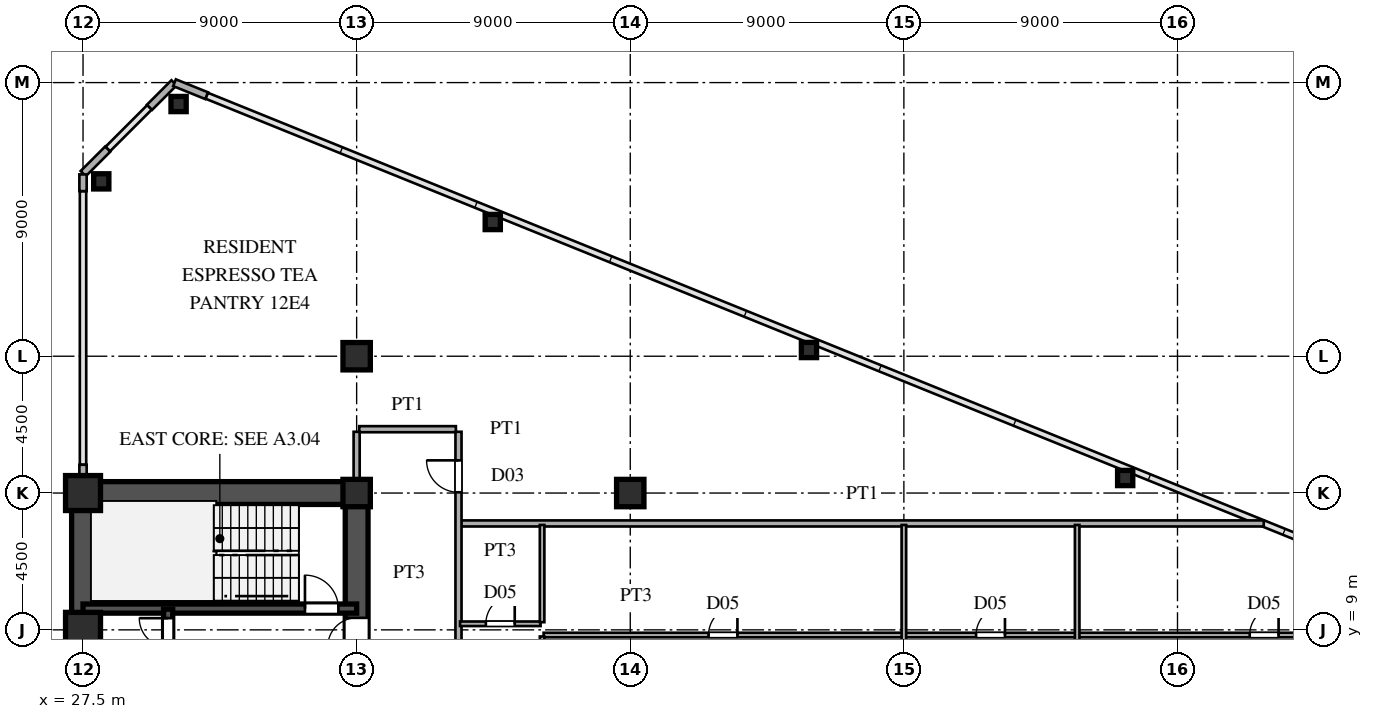
"""IFC4 building model, lengths in metres.
Left out: names, types, materials, properties, quantities, classifications, styles, units other than length and angle.
Written with IfcOpenShell. Run it as: python <this file> out.ifc"""

import sys

from ifc_helpers import new_model, si_unit, direction, frame, frame_2d, origin, origin_2d, place, context, subcontext, project, spatial, rectangle, hollow_rectangle, i_section, extrude, source, transform, mapped, element, fill, save


model = new_model("IFC4")
c1 = context("Model", 3, precision=1e-05, world=origin(), true_north=direction((0.0, 1.0)))
c2 = subcontext(c1, "Body", "Model", "MODEL_VIEW")
j1 = project(units=[si_unit("LENGTHUNIT", "METRE"), si_unit("PLANEANGLEUNIT", "RADIAN")], contexts=[c1])
p1 = place(None, origin())
s1 = spatial("IfcSite", under=j1, at=p1, CompositionType="ELEMENT")
p2 = place(p1, origin())
s2 = spatial("IfcBuilding", under=s1, at=p2, CompositionType="ELEMENT")
p3 = place(p2, frame((0.0, 0.0, 47.7)))
s3 = spatial("IfcBuildingStorey", under=s2, at=p3, CompositionType="ELEMENT", Elevation=47.7)
m1 = source(origin(), c2, "Body", "SweptSolid", [
    extrude(hollow_rectangle(XDim=1.15, YDim=1.15, WallThickness=0.048, at=origin_2d()), origin(), (0.0, 0.0, 1.0), 3.6),
])
for number, where, z_axis, x_axis in (
    (1, (27.5, 9.0, 0.0), (0.0, 0.0, 1.0), (1.0, 0.0, 0.0)),
    (2, (27.5, 13.5, 0.0), (0.0, 0.0, 1.0), (1.0, 0.0, 0.0)),
):
    element("IfcColumn", number, at=place(p3, frame(where, z_axis=z_axis, x_axis=x_axis)), inside=s3, PredefinedType="COLUMN", context=c2, shape_type="MappedRepresentation", body=[
        mapped(m1, transform((0.0, 0.0, 0.0), scale=1.0)),
    ])
m2 = source(origin(), c2, "Body", "SweptSolid", [
    extrude(i_section(OverallWidth=0.9, OverallDepth=0.9, WebThickness=0.036, FlangeThickness=0.055, at=origin_2d()), origin(), (0.0, 0.0, 1.0), 3.6),
])
for number, where, z_axis, x_axis in (
    (3, (36.5, 13.5, 0.0), (0.0, 0.0, 1.0), (1.0, 0.0, 0.0)),
    (4, (36.5, 18.0, 0.0), (0.0, 0.0, 1.0), (1.0, 0.0, 0.0)),
    (5, (45.5, 13.5, 0.0), (0.0, 0.0, 1.0), (1.0, 0.0, 0.0)),
):
    element("IfcColumn", number, at=place(p3, frame(where, z_axis=z_axis, x_axis=x_axis)), inside=s3, PredefinedType="COLUMN", context=c2, shape_type="MappedRepresentation", body=[
        mapped(m2, transform((0.0, 0.0, 0.0), scale=1.0)),
    ])
m3 = source(origin(), c2, "Body", "SweptSolid", [
    extrude(hollow_rectangle(XDim=0.5, YDim=0.5, WallThickness=0.02, at=origin_2d()), origin(), (0.0, 0.0, 1.0), 3.6),
])
for number, where, z_axis, x_axis in (
    (6, (30.643, 26.295, 0.0), (0.0, 0.0, 1.0), (1.0, 0.0, 0.0)),
    (7, (28.1, 23.751, 0.0), (0.0, 0.0, 1.0), (1.0, 0.0, 0.0)),
    (8, (40.977, 22.414, 0.0), (0.0, 0.0, 1.0), (1.0, 0.0, 0.0)),
    (9, (51.378, 18.204, 0.0), (0.0, 0.0, 1.0), (1.0, 0.0, 0.0)),
    (10, (61.779, 13.994, 0.0), (0.0, 0.0, 1.0), (1.0, 0.0, 0.0)),
):
    element("IfcColumn", number, at=place(p3, frame(where, z_axis=z_axis, x_axis=x_axis)), inside=s3, PredefinedType="COLUMN", context=c2, shape_type="MappedRepresentation", body=[
        mapped(m3, transform((0.0, 0.0, 0.0), scale=1.0)),
    ])
p4 = place(p3, frame((31.566, 26.569, 0.0), z_axis=(0.0, 0.0, 1.0), x_axis=(-0.927007103665, 0.375043770452, 0.0)))
e11 = element("IfcWall", 11, at=p4, inside=s3, PredefinedType="SOLIDWALL", context=c2, shape_type="SweptSolid", body=[
    extrude(rectangle(XDim=1.14, YDim=0.24, at=frame_2d((0.57, 0.0))), origin(), (0.0, 0.0, 1.0), 3.38),
])
for number, where, z_axis, x_axis in (
    (12, (30.493, 26.993, 0.0), (0.0, 0.0, 1.0), (-0.707, -0.707, 0.0)),
    (13, (28.313, 24.813, 0.0), (0.0, 0.0, 1.0), (-0.707, -0.707, 0.0)),
):
    element("IfcWall", number, at=place(p3, frame(where, z_axis=z_axis, x_axis=x_axis)), inside=s3, PredefinedType="SOLIDWALL", context=c2, shape_type="SweptSolid", body=[
        extrude(rectangle(XDim=1.14, YDim=0.24, at=frame_2d((0.57, 0.0))), origin(), (0.0, 0.0, 1.0), 3.38),
    ])
p5 = place(p3, frame((27.5, 13.88, 0.0), z_axis=(0.0, 0.0, 1.0), x_axis=(0.0, 1.0, 0.0)))
e14 = element("IfcWall", 14, at=p5, inside=s3, PredefinedType="SOLIDWALL", context=c2, shape_type="SweptSolid", body=[
    extrude(rectangle(XDim=0.55, YDim=0.24, at=frame_2d((0.275, 0.0))), origin(), (0.0, 0.0, 1.0), 2.88),
])
p6 = place(p3, frame((27.5, 23.43, 0.0), z_axis=(0.0, 0.0, 1.0), x_axis=(0.0, 1.0, 0.0)))
e15 = element("IfcWall", 15, at=p6, inside=s3, PredefinedType="SOLIDWALL", context=c2, shape_type="SweptSolid", body=[
    extrude(rectangle(XDim=0.55, YDim=0.24, at=frame_2d((0.275, 0.0))), origin(), (0.0, 0.0, 1.0), 3.38),
])
p7 = place(p3, frame((27.5, 1.3, 0.0), z_axis=(0.0, 0.0, 1.0), x_axis=(0.0, 1.0, 0.0)))
e16 = element("IfcWall", 16, at=p7, inside=s3, PredefinedType="SHEAR", context=c2, shape_type="SweptSolid", body=[
    extrude(rectangle(XDim=12.2, YDim=0.75, at=frame_2d((6.1, 0.0))), origin(), (0.0, 0.0, 1.0), 3.38),
])
p8 = place(p3, frame((27.5, 13.5, 0.0), z_axis=(0.0, 0.0, 1.0), x_axis=(1.0, 0.0, 0.0)))
e17 = element("IfcWall", 17, at=p8, inside=s3, PredefinedType="SHEAR", context=c2, shape_type="SweptSolid", body=[
    extrude(rectangle(XDim=9.0, YDim=0.75, at=frame_2d((4.5, 0.0))), origin(), (0.0, 0.0, 1.0), 3.38),
])
p9 = place(p3, frame((36.5, 8.2, 0.0), z_axis=(0.0, 0.0, 1.0), x_axis=(0.0, 1.0, 0.0)))
e18 = element("IfcWall", 18, at=p9, inside=s3, PredefinedType="SHEAR", context=c2, shape_type="SweptSolid", body=[
    extrude(rectangle(XDim=5.45, YDim=0.75, at=frame_2d((2.725, 0.0))), origin(), (0.0, 0.0, 1.0), 3.38),
])
p10 = place(p9, frame((0.245, 0.0, 0.0)))
e19 = element("IfcOpeningElement", 19, at=p10, cuts=e18, PredefinedType="OPENING", context=c2, shape_type="SweptSolid", body=[
    extrude(rectangle(XDim=0.95, YDim=2.15, at=frame_2d((0.475, 1.075))), frame((0.0, 0.385, 0.0), z_axis=(0.0, -1.0, 0.0), x_axis=(1.0, 0.0, 0.0)), (0.0, 0.0, 1.0), 0.77),
])
p11 = place(p3, frame((27.5, 9.7, 0.0), z_axis=(0.0, 0.0, 1.0), x_axis=(1.0, 0.0, 0.0)))
e20 = element("IfcWall", 20, at=p11, inside=s3, PredefinedType="SHEAR", context=c2, shape_type="SweptSolid", body=[
    extrude(rectangle(XDim=9.0, YDim=0.3, at=frame_2d((4.5, 0.0))), origin(), (0.0, 0.0, 1.0), 3.38),
])
p12 = place(p11, frame((7.3, 0.0, 0.0)))
e21 = element("IfcOpeningElement", 21, at=p12, cuts=e20, PredefinedType="OPENING", context=c2, shape_type="SweptSolid", body=[
    extrude(rectangle(XDim=1.1, YDim=2.2, at=frame_2d((0.55, 1.1))), frame((0.0, 0.16, 0.0), z_axis=(0.0, -1.0, 0.0), x_axis=(1.0, 0.0, 0.0)), (0.0, 0.0, 1.0), 0.32),
])
p13 = place(p3, frame((30.3, 8.15, 0.0), z_axis=(0.0, 0.0, 1.0), x_axis=(0.0, 1.0, 0.0)))
e22 = element("IfcWall", 22, at=p13, inside=s3, PredefinedType="SHEAR", context=c2, shape_type="SweptSolid", body=[
    extrude(rectangle(XDim=1.53, YDim=0.3, at=frame_2d((0.765, 0.0))), origin(), (0.0, 0.0, 1.0), 3.38),
])
p14 = place(p13, frame((0.285, 0.0, 0.0)))
e23 = element("IfcOpeningElement", 23, at=p14, cuts=e22, PredefinedType="OPENING", context=c2, shape_type="SweptSolid", body=[
    extrude(rectangle(XDim=0.95, YDim=2.15, at=frame_2d((0.475, 1.075))), frame((0.0, 0.16, 0.0), z_axis=(0.0, -1.0, 0.0), x_axis=(1.0, 0.0, 0.0)), (0.0, 0.0, 1.0), 0.32),
])
p15 = place(p3, frame((42.65, 8.83, 0.0), z_axis=(0.0, 0.0, 1.0), x_axis=(1.0, 0.0, 0.0)))
e24 = element("IfcWall", 24, at=p15, inside=s3, PredefinedType="PARTITIONING", context=c2, shape_type="SweptSolid", body=[
    extrude(rectangle(XDim=29.885, YDim=0.15, at=frame_2d((14.942, 0.0))), origin(), (0.0, 0.0, 1.0), 3.38),
])
p16 = place(p15, frame((5.425, 0.0, 0.0)))
e25 = element("IfcOpeningElement", 25, at=p16, cuts=e24, PredefinedType="OPENING", context=c2, shape_type="SweptSolid", body=[
    extrude(rectangle(XDim=0.95, YDim=2.15, at=frame_2d((0.475, 1.075))), frame((0.0, 0.085, 0.0), z_axis=(0.0, -1.0, 0.0), x_axis=(1.0, 0.0, 0.0)), (0.0, 0.0, 1.0), 0.17),
])
p17 = place(p15, frame((23.225, 0.0, 0.0)))
e26 = element("IfcOpeningElement", 26, at=p17, cuts=e24, PredefinedType="OPENING", context=c2, shape_type="SweptSolid", body=[
    extrude(rectangle(XDim=0.95, YDim=2.15, at=frame_2d((0.475, 1.075))), frame((0.0, 0.085, 0.0), z_axis=(0.0, -1.0, 0.0), x_axis=(1.0, 0.0, 0.0)), (0.0, 0.0, 1.0), 0.17),
])
p18 = place(p15, frame((14.225, 0.0, 0.0)))
e27 = element("IfcOpeningElement", 27, at=p18, cuts=e24, PredefinedType="OPENING", context=c2, shape_type="SweptSolid", body=[
    extrude(rectangle(XDim=0.95, YDim=2.15, at=frame_2d((0.475, 1.075))), frame((0.0, 0.085, 0.0), z_axis=(0.0, -1.0, 0.0), x_axis=(1.0, 0.0, 0.0)), (0.0, 0.0, 1.0), 0.17),
])
p19 = place(p3, frame((39.9, 9.2, 0.0), z_axis=(0.0, 0.0, 1.0), x_axis=(1.0, 0.0, 0.0)))
e28 = element("IfcWall", 28, at=p19, inside=s3, PredefinedType="PARTITIONING", context=c2, shape_type="SweptSolid", body=[
    extrude(rectangle(XDim=2.65, YDim=0.15, at=frame_2d((1.325, 0.0))), origin(), (0.0, 0.0, 1.0), 3.38),
])
p20 = place(p19, frame((0.85, 0.0, 0.0)))
e29 = element("IfcOpeningElement", 29, at=p20, cuts=e28, PredefinedType="OPENING", context=c2, shape_type="SweptSolid", body=[
    extrude(rectangle(XDim=0.95, YDim=2.15, at=frame_2d((0.475, 1.075))), frame((0.0, 0.085, 0.0), z_axis=(0.0, -1.0, 0.0), x_axis=(1.0, 0.0, 0.0)), (0.0, 0.0, 1.0), 0.17),
])
p21 = place(p3, frame((39.93, 12.5, 0.0), z_axis=(0.0, 0.0, 1.0), x_axis=(1.0, 0.0, 0.0)))
e30 = element("IfcWall", 30, at=p21, inside=s3, PredefinedType="PARTITIONING", context=c2, shape_type="SweptSolid", body=[
    extrude(rectangle(XDim=26.407, YDim=0.2, at=frame_2d((13.204, 0.0))), origin(), (0.0, 0.0, 1.0), 3.38),
])
p22 = place(p3, frame((36.585, 15.6, 0.0), z_axis=(0.0, 0.0, 1.0), x_axis=(1.0, 0.0, 0.0)))
e31 = element("IfcWall", 31, at=p22, inside=s3, PredefinedType="PARTITIONING", context=c2, shape_type="SweptSolid", body=[
    extrude(rectangle(XDim=3.18, YDim=0.2, at=frame_2d((1.59, 0.0))), origin(), (0.0, 0.0, 1.0), 3.38),
])
p23 = place(p3, frame((36.5, 13.88, 0.0), z_axis=(0.0, 0.0, 1.0), x_axis=(0.0, 1.0, 0.0)))
e32 = element("IfcWall", 32, at=p23, inside=s3, PredefinedType="PARTITIONING", context=c2, shape_type="SweptSolid", body=[
    extrude(rectangle(XDim=1.635, YDim=0.2, at=frame_2d((0.817, 0.0))), origin(), (0.0, 0.0, 1.0), 2.68),
])
p24 = place(p3, frame((39.85, -15.515, 0.0), z_axis=(0.0, 0.0, 1.0), x_axis=(0.0, 1.0, 0.0)))
e33 = element("IfcWall", 33, at=p24, inside=s3, PredefinedType="PARTITIONING", context=c2, shape_type="SweptSolid", body=[
    extrude(rectangle(XDim=31.03, YDim=0.2, at=frame_2d((15.515, 0.0))), origin(), (0.0, 0.0, 1.0), 3.38),
])
p25 = place(p24, frame((0.94, 0.0, 0.0)))
e34 = element("IfcOpeningElement", 34, at=p25, cuts=e33, PredefinedType="OPENING", context=c2, shape_type="SweptSolid", body=[
    extrude(rectangle(XDim=1.05, YDim=2.25, at=frame_2d((0.525, 1.125))), frame((0.0, 0.11, 0.0), z_axis=(0.0, -1.0, 0.0), x_axis=(1.0, 0.0, 0.0)), (0.0, 0.0, 1.0), 0.22),
])
p26 = place(p24, frame((9.28, 0.0, 0.0)))
e35 = element("IfcOpeningElement", 35, at=p26, cuts=e33, PredefinedType="OPENING", context=c2, shape_type="SweptSolid", body=[
    extrude(rectangle(XDim=1.05, YDim=2.25, at=frame_2d((0.525, 1.125))), frame((0.0, 0.11, 0.0), z_axis=(0.0, -1.0, 0.0), x_axis=(1.0, 0.0, 0.0)), (0.0, 0.0, 1.0), 0.22),
])
p27 = place(p24, frame((21.825, 0.0, 0.0)))
e36 = element("IfcOpeningElement", 36, at=p27, cuts=e33, PredefinedType="OPENING", context=c2, shape_type="SweptSolid", body=[
    extrude(rectangle(XDim=1.05, YDim=2.25, at=frame_2d((0.525, 1.125))), frame((0.0, 0.11, 0.0), z_axis=(0.0, -1.0, 0.0), x_axis=(1.0, 0.0, 0.0)), (0.0, 0.0, 1.0), 0.22),
])
p28 = place(p24, frame((29.04, 0.0, 0.0)))
e37 = element("IfcOpeningElement", 37, at=p28, cuts=e33, PredefinedType="OPENING", context=c2, shape_type="SweptSolid", body=[
    extrude(rectangle(XDim=1.05, YDim=2.25, at=frame_2d((0.525, 1.125))), frame((0.0, 0.11, 0.0), z_axis=(0.0, -1.0, 0.0), x_axis=(1.0, 0.0, 0.0)), (0.0, 0.0, 1.0), 0.22),
])
p29 = place(p3, frame((42.6, 5.217, 0.0), z_axis=(0.0, 0.0, 1.0), x_axis=(0.0, 1.0, 0.0)))
e38 = element("IfcWall", 38, at=p29, inside=s3, PredefinedType="PARTITIONING", context=c2, shape_type="SweptSolid", body=[
    extrude(rectangle(XDim=3.566, YDim=0.15, at=frame_2d((1.783, 0.0))), origin(), (0.0, 0.0, 1.0), 3.38),
])
p30 = place(p29, frame((1.308, 0.0, 0.0)))
e39 = element("IfcOpeningElement", 39, at=p30, cuts=e38, PredefinedType="OPENING", context=c2, shape_type="SweptSolid", body=[
    extrude(rectangle(XDim=0.95, YDim=2.15, at=frame_2d((0.475, 1.075))), frame((0.0, 0.085, 0.0), z_axis=(0.0, -1.0, 0.0), x_axis=(1.0, 0.0, 0.0)), (0.0, 0.0, 1.0), 0.17),
])
p31 = place(p3, frame((42.6, 9.252, 0.0), z_axis=(0.0, 0.0, 1.0), x_axis=(0.0, 1.0, 0.0)))
e40 = element("IfcWall", 40, at=p31, inside=s3, PredefinedType="PARTITIONING", context=c2, shape_type="SweptSolid", body=[
    extrude(rectangle(XDim=3.198, YDim=0.15, at=frame_2d((1.599, 0.0))), origin(), (0.0, 0.0, 1.0), 3.38),
])
p32 = place(p3, frame((54.5, -12.45, 0.0), z_axis=(0.0, 0.0, 1.0), x_axis=(0.0, 1.0, 0.0)))
e41 = element("IfcWall", 41, at=p32, inside=s3, PredefinedType="PARTITIONING", context=c2, shape_type="SweptSolid", body=[
    extrude(rectangle(XDim=24.9, YDim=0.15, at=frame_2d((12.45, 0.0))), origin(), (0.0, 0.0, 1.0), 2.68),
])
p33 = place(p32, frame((6.475, 0.0, 0.0)))
e42 = element("IfcOpeningElement", 42, at=p33, cuts=e41, PredefinedType="OPENING", context=c2, shape_type="SweptSolid", body=[
    extrude(rectangle(XDim=0.95, YDim=2.15, at=frame_2d((0.475, 1.075))), frame((0.0, 0.085, 0.0), z_axis=(0.0, -1.0, 0.0), x_axis=(1.0, 0.0, 0.0)), (0.0, 0.0, 1.0), 0.17),
])
p34 = place(p32, frame((18.975, 0.0, 0.0)))
e43 = element("IfcOpeningElement", 43, at=p34, cuts=e41, PredefinedType="OPENING", context=c2, shape_type="SweptSolid", body=[
    extrude(rectangle(XDim=0.95, YDim=2.15, at=frame_2d((0.475, 1.075))), frame((0.0, 0.085, 0.0), z_axis=(0.0, -1.0, 0.0), x_axis=(1.0, 0.0, 0.0)), (0.0, 0.0, 1.0), 0.17),
])
p35 = place(p3, frame((60.2, -12.45, 0.0), z_axis=(0.0, 0.0, 1.0), x_axis=(0.0, 1.0, 0.0)))
e44 = element("IfcWall", 44, at=p35, inside=s3, PredefinedType="PARTITIONING", context=c2, shape_type="SweptSolid", body=[
    extrude(rectangle(XDim=24.9, YDim=0.15, at=frame_2d((12.45, 0.0))), origin(), (0.0, 0.0, 1.0), 3.38),
])
p36 = place(p35, frame((1.808, 0.0, 0.0)))
e45 = element("IfcOpeningElement", 45, at=p36, cuts=e44, PredefinedType="OPENING", context=c2, shape_type="SweptSolid", body=[
    extrude(rectangle(XDim=0.95, YDim=2.15, at=frame_2d((0.475, 1.075))), frame((0.0, 0.085, 0.0), z_axis=(0.0, -1.0, 0.0), x_axis=(1.0, 0.0, 0.0)), (0.0, 0.0, 1.0), 0.17),
])
p37 = place(p35, frame((6.475, 0.0, 0.0)))
e46 = element("IfcOpeningElement", 46, at=p37, cuts=e44, PredefinedType="OPENING", context=c2, shape_type="SweptSolid", body=[
    extrude(rectangle(XDim=0.95, YDim=2.15, at=frame_2d((0.475, 1.075))), frame((0.0, 0.085, 0.0), z_axis=(0.0, -1.0, 0.0), x_axis=(1.0, 0.0, 0.0)), (0.0, 0.0, 1.0), 0.17),
])
p38 = place(p35, frame((11.142, 0.0, 0.0)))
e47 = element("IfcOpeningElement", 47, at=p38, cuts=e44, PredefinedType="OPENING", context=c2, shape_type="SweptSolid", body=[
    extrude(rectangle(XDim=0.95, YDim=2.15, at=frame_2d((0.475, 1.075))), frame((0.0, 0.085, 0.0), z_axis=(0.0, -1.0, 0.0), x_axis=(1.0, 0.0, 0.0)), (0.0, 0.0, 1.0), 0.17),
])
p39 = place(p35, frame((15.308, 0.0, 0.0)))
e48 = element("IfcOpeningElement", 48, at=p39, cuts=e44, PredefinedType="OPENING", context=c2, shape_type="SweptSolid", body=[
    extrude(rectangle(XDim=0.95, YDim=2.15, at=frame_2d((0.475, 1.075))), frame((0.0, 0.085, 0.0), z_axis=(0.0, -1.0, 0.0), x_axis=(1.0, 0.0, 0.0)), (0.0, 0.0, 1.0), 0.17),
])
p40 = place(p35, frame((18.975, 0.0, 0.0)))
e49 = element("IfcOpeningElement", 49, at=p40, cuts=e44, PredefinedType="OPENING", context=c2, shape_type="SweptSolid", body=[
    extrude(rectangle(XDim=0.95, YDim=2.15, at=frame_2d((0.475, 1.075))), frame((0.0, 0.085, 0.0), z_axis=(0.0, -1.0, 0.0), x_axis=(1.0, 0.0, 0.0)), (0.0, 0.0, 1.0), 0.17),
])
m4 = source(origin(), c2, "Body", "SweptSolid", [
    extrude(rectangle(XDim=0.95, YDim=2.15, at=frame_2d((0.475, 1.075))), frame((0.0, 0.025, 0.0), z_axis=(0.0, -1.0, 0.0), x_axis=(1.0, 0.0, 0.0)), (0.0, 0.0, 1.0), 0.05),
])
p41 = place(p10, origin())
e50 = element("IfcDoor", 50, at=p41, inside=s3, OperationType="SINGLE_SWING_LEFT", PredefinedType="DOOR", context=c2, shape_type="MappedRepresentation", body=[
    mapped(m4, transform((0.0, 0.0, 0.0), scale=1.0)),
])
fill(e19, e50)
m5 = source(origin(), c2, "Body", "SweptSolid", [
    extrude(rectangle(XDim=1.1, YDim=2.2, at=frame_2d((0.55, 1.1))), frame((0.0, 0.025, 0.0), z_axis=(0.0, -1.0, 0.0), x_axis=(1.0, 0.0, 0.0)), (0.0, 0.0, 1.0), 0.05),
])
p42 = place(p12, origin())
e51 = element("IfcDoor", 51, at=p42, inside=s3, OperationType="SINGLE_SWING_LEFT", PredefinedType="DOOR", context=c2, shape_type="MappedRepresentation", body=[
    mapped(m5, transform((0.0, 0.0, 0.0), scale=1.0)),
])
fill(e21, e51)
p43 = place(p14, origin())
e52 = element("IfcDoor", 52, at=p43, inside=s3, OperationType="SINGLE_SWING_RIGHT", PredefinedType="DOOR", context=c2, shape_type="MappedRepresentation", body=[
    mapped(m4, transform((0.0, 0.0, 0.0), scale=1.0)),
])
fill(e23, e52)
m6 = source(origin(), c2, "Body", "SweptSolid", [
    extrude(rectangle(XDim=0.95, YDim=2.15, at=frame_2d((0.475, 1.075))), frame((0.0, 0.025, 0.0), z_axis=(0.0, -1.0, 0.0), x_axis=(1.0, 0.0, 0.0)), (0.0, 0.0, 1.0), 0.05),
])
p44 = place(p16, origin())
e53 = element("IfcDoor", 53, at=p44, inside=s3, OperationType="SINGLE_SWING_RIGHT", PredefinedType="DOOR", context=c2, shape_type="MappedRepresentation", body=[
    mapped(m6, transform((0.0, 0.0, 0.0), scale=1.0)),
])
fill(e25, e53)
p45 = place(p17, origin())
e54 = element("IfcDoor", 54, at=p45, inside=s3, OperationType="SINGLE_SWING_RIGHT", PredefinedType="DOOR", context=c2, shape_type="MappedRepresentation", body=[
    mapped(m6, transform((0.0, 0.0, 0.0), scale=1.0)),
])
fill(e26, e54)
p46 = place(p18, origin())
e55 = element("IfcDoor", 55, at=p46, inside=s3, OperationType="SINGLE_SWING_RIGHT", PredefinedType="DOOR", context=c2, shape_type="MappedRepresentation", body=[
    mapped(m6, transform((0.0, 0.0, 0.0), scale=1.0)),
])
fill(e27, e55)
p47 = place(p20, origin())
e56 = element("IfcDoor", 56, at=p47, inside=s3, OperationType="SINGLE_SWING_RIGHT", PredefinedType="DOOR", context=c2, shape_type="MappedRepresentation", body=[
    mapped(m6, transform((0.0, 0.0, 0.0), scale=1.0)),
])
fill(e29, e56)
m7 = source(origin(), c2, "Body", "SweptSolid", [
    extrude(rectangle(XDim=1.05, YDim=2.25, at=frame_2d((0.525, 1.125))), frame((0.0, 0.025, 0.0), z_axis=(0.0, -1.0, 0.0), x_axis=(1.0, 0.0, 0.0)), (0.0, 0.0, 1.0), 0.05),
])
p48 = place(p28, origin())
e57 = element("IfcDoor", 57, at=p48, inside=s3, OperationType="SINGLE_SWING_RIGHT", PredefinedType="DOOR", context=c2, shape_type="MappedRepresentation", body=[
    mapped(m7, transform((0.0, 0.0, 0.0), scale=1.0)),
])
fill(e37, e57)
save(model, sys.argv[1])
